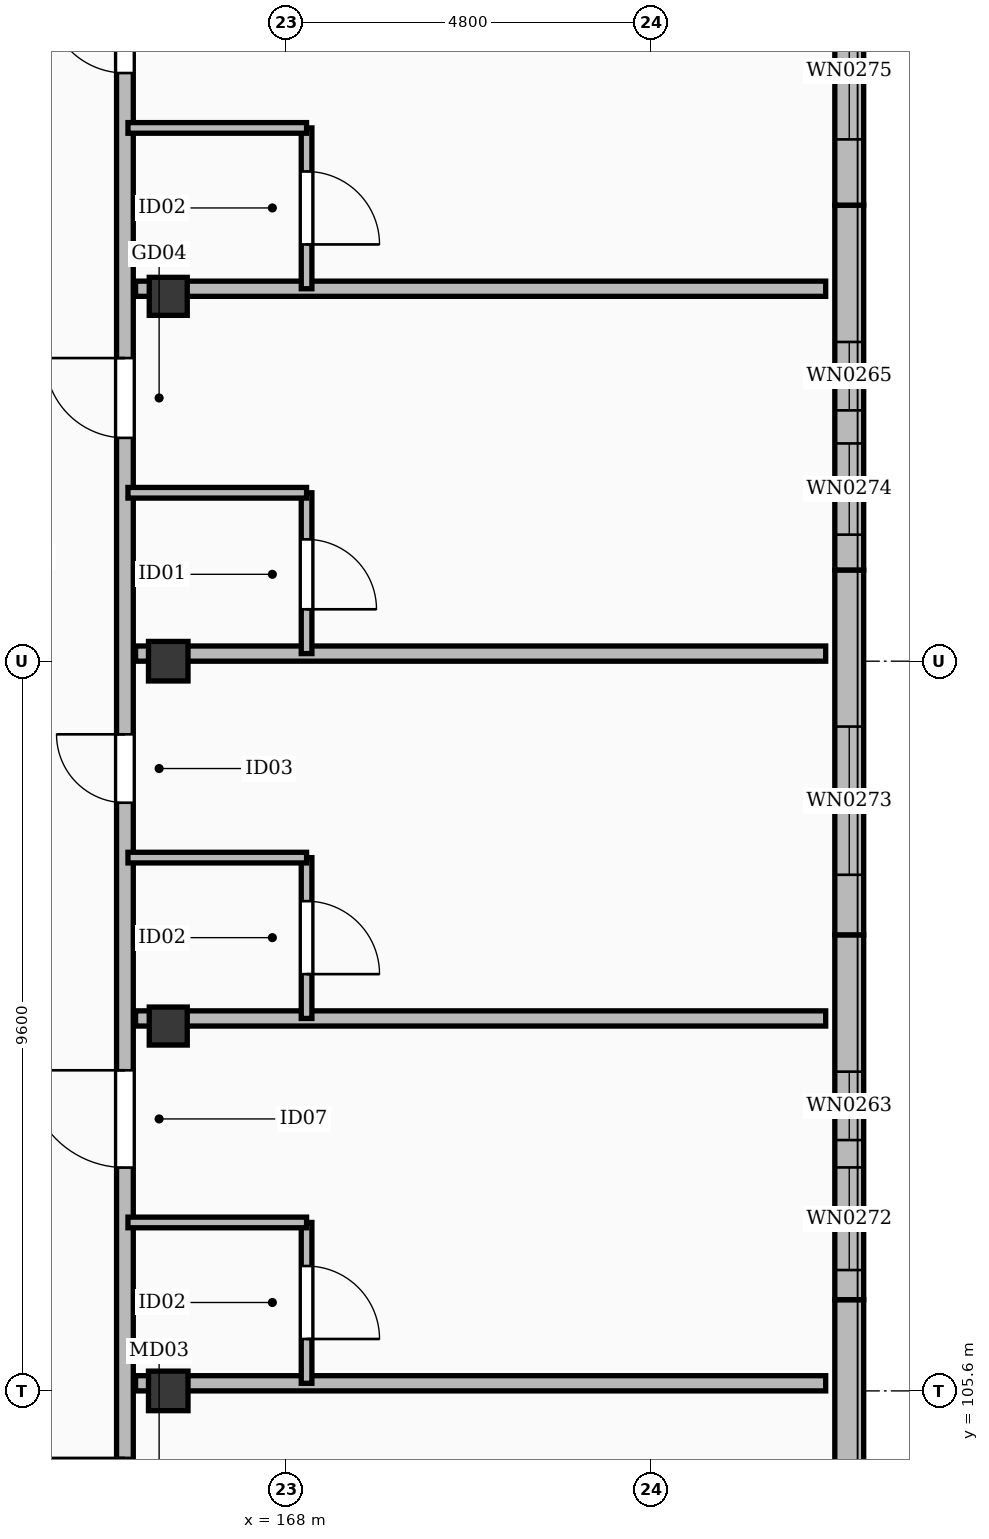
"""IFC4 building model, lengths in metres.
Left out: names, types, materials, properties, quantities, classifications, styles, units other than length and angle.
Written with IfcOpenShell. Run it as: python <this file> out.ifc"""

import sys

from ifc_helpers import new_model, si_unit, direction, frame, frame_2d, origin, origin_2d, place, context, subcontext, project, spatial, rectangle, extrude, element, fill, save


model = new_model("IFC4")
c1 = context("Model", 3, precision=1e-05, world=origin(), true_north=direction((0.0, 1.0)))
c2 = subcontext(c1, "Body", "Model", "MODEL_VIEW")
j1 = project(units=[si_unit("LENGTHUNIT", "METRE"), si_unit("PLANEANGLEUNIT", "RADIAN")], contexts=[c1])
p1 = place(None, origin())
s1 = spatial("IfcSite", under=j1, at=p1, CompositionType="ELEMENT")
p2 = place(p1, origin())
s2 = spatial("IfcBuilding", under=s1, at=p2, CompositionType="ELEMENT")
p3 = place(p2, frame((0.0, 0.0, 50.4)))
s3 = spatial("IfcBuildingStorey", under=s2, at=p3, CompositionType="ELEMENT", Elevation=50.4)
for number, where, z_axis, x_axis in (
    (1, (166.45, 105.6, 0.0), (0.0, 0.0, 1.0), (1.0, 0.0, 0.0)),
    (2, (166.45, 115.2, 0.0), (0.0, 0.0, 1.0), (1.0, 0.0, 0.0)),
):
    element("IfcColumn", number, at=place(p3, frame(where, z_axis=z_axis, x_axis=x_axis)), inside=s3, PredefinedType="COLUMN", context=c2, shape_type="SweptSolid", body=[
        extrude(rectangle(XDim=0.52, YDim=0.52, at=origin_2d()), origin(), (0.0, 0.0, 1.0), 4.2),
    ])
for number, where, z_axis, x_axis in (
    (3, (166.45, 110.4, 0.0), (0.0, 0.0, 1.0), (1.0, 0.0, 0.0)),
    (4, (166.45, 120.0, 0.0), (0.0, 0.0, 1.0), (1.0, 0.0, 0.0)),
):
    element("IfcColumn", number, at=place(p3, frame(where, z_axis=z_axis, x_axis=x_axis)), inside=s3, PredefinedType="COLUMN", context=c2, shape_type="SweptSolid", body=[
        extrude(rectangle(XDim=0.5, YDim=0.5, at=origin_2d()), origin(), (0.0, 0.0, 1.0), 4.2),
    ])
p4 = place(p3, frame((175.41, 106.8, 0.0), z_axis=(0.0, 0.0, 1.0), x_axis=(0.0, -1.0, 0.0)))
e5 = element("IfcWall", 5, at=p4, inside=s3, PredefinedType="SOLIDWALL", context=c2, shape_type="SweptSolid", body=[
    extrude(rectangle(XDim=4.8, YDim=0.38, at=frame_2d((2.4, 0.0))), origin(), (0.0, 0.0, 1.0), 3.96),
])
p5 = place(p4, frame((2.51, 0.0, 0.55)))
e6 = element("IfcOpeningElement", 6, at=p5, cuts=e5, PredefinedType="OPENING", context=c2, shape_type="SweptSolid", body=[
    extrude(rectangle(XDim=1.05, YDim=1.65, at=frame_2d((0.525, 0.825))), frame((0.0, 0.202, 0.0), z_axis=(0.0, -1.0, 0.0), x_axis=(1.0, 0.0, 0.0)), (0.0, 0.0, 1.0), 0.404),
])
p6 = place(p3, frame((175.41, 111.6, 0.0), z_axis=(0.0, 0.0, 1.0), x_axis=(0.0, -1.0, 0.0)))
e7 = element("IfcWall", 7, at=p6, inside=s3, PredefinedType="SOLIDWALL", context=c2, shape_type="SweptSolid", body=[
    extrude(rectangle(XDim=4.8, YDim=0.38, at=frame_2d((2.4, 0.0))), origin(), (0.0, 0.0, 1.0), 3.96),
])
p7 = place(p6, frame((1.8, 0.0, 0.35)))
e8 = element("IfcOpeningElement", 8, at=p7, cuts=e7, PredefinedType="OPENING", context=c2, shape_type="SweptSolid", body=[
    extrude(rectangle(XDim=0.9, YDim=1.68, at=frame_2d((0.45, 0.84))), frame((0.0, 0.202, 0.0), z_axis=(0.0, -1.0, 0.0), x_axis=(1.0, 0.0, 0.0)), (0.0, 0.0, 1.0), 0.404),
])
p8 = place(p6, frame((3.06, 0.0, 0.55)))
e9 = element("IfcOpeningElement", 9, at=p8, cuts=e7, PredefinedType="OPENING", context=c2, shape_type="SweptSolid", body=[
    extrude(rectangle(XDim=1.35, YDim=1.73, at=frame_2d((0.675, 0.865))), frame((0.0, 0.202, 0.0), z_axis=(0.0, -1.0, 0.0), x_axis=(1.0, 0.0, 0.0)), (0.0, 0.0, 1.0), 0.404),
])
p9 = place(p3, frame((175.41, 116.4, 0.0), z_axis=(0.0, 0.0, 1.0), x_axis=(0.0, -1.0, 0.0)))
e10 = element("IfcWall", 10, at=p9, inside=s3, PredefinedType="SOLIDWALL", context=c2, shape_type="SweptSolid", body=[
    extrude(rectangle(XDim=4.8, YDim=0.38, at=frame_2d((2.4, 0.0))), origin(), (0.0, 0.0, 1.0), 3.96),
])
p10 = place(p9, frame((2.06, 0.0, 0.55)))
e11 = element("IfcOpeningElement", 11, at=p10, cuts=e10, PredefinedType="OPENING", context=c2, shape_type="SweptSolid", body=[
    extrude(rectangle(XDim=1.95, YDim=1.77, at=frame_2d((0.975, 0.885))), frame((0.0, 0.202, 0.0), z_axis=(0.0, -1.0, 0.0), x_axis=(1.0, 0.0, 0.0)), (0.0, 0.0, 1.0), 0.404),
])
p11 = place(p3, frame((175.41, 121.2, 0.0), z_axis=(0.0, 0.0, 1.0), x_axis=(0.0, -1.0, 0.0)))
e12 = element("IfcWall", 12, at=p11, inside=s3, PredefinedType="SOLIDWALL", context=c2, shape_type="SweptSolid", body=[
    extrude(rectangle(XDim=4.8, YDim=0.38, at=frame_2d((2.4, 0.0))), origin(), (0.0, 0.0, 1.0), 3.96),
])
p12 = place(p11, frame((1.8, 0.0, 0.35)))
e13 = element("IfcOpeningElement", 13, at=p12, cuts=e12, PredefinedType="OPENING", context=c2, shape_type="SweptSolid", body=[
    extrude(rectangle(XDim=0.9, YDim=1.68, at=frame_2d((0.45, 0.84))), frame((0.0, 0.202, 0.0), z_axis=(0.0, -1.0, 0.0), x_axis=(1.0, 0.0, 0.0)), (0.0, 0.0, 1.0), 0.404),
])
p13 = place(p11, frame((3.135, 0.0, 0.55)))
e14 = element("IfcOpeningElement", 14, at=p13, cuts=e12, PredefinedType="OPENING", context=c2, shape_type="SweptSolid", body=[
    extrude(rectangle(XDim=1.2, YDim=1.72, at=frame_2d((0.6, 0.86))), frame((0.0, 0.202, 0.0), z_axis=(0.0, -1.0, 0.0), x_axis=(1.0, 0.0, 0.0)), (0.0, 0.0, 1.0), 0.404),
])
p14 = place(p3, frame((175.41, 126.0, 0.0), z_axis=(0.0, 0.0, 1.0), x_axis=(0.0, -1.0, 0.0)))
e15 = element("IfcWall", 15, at=p14, inside=s3, PredefinedType="SOLIDWALL", context=c2, shape_type="SweptSolid", body=[
    extrude(rectangle(XDim=4.8, YDim=0.38, at=frame_2d((2.4, 0.0))), origin(), (0.0, 0.0, 1.0), 3.96),
])
p15 = place(p14, frame((2.135, 0.0, 0.55)))
e16 = element("IfcOpeningElement", 16, at=p15, cuts=e15, PredefinedType="OPENING", context=c2, shape_type="SweptSolid", body=[
    extrude(rectangle(XDim=1.8, YDim=1.76, at=frame_2d((0.9, 0.88))), frame((0.0, 0.202, 0.0), z_axis=(0.0, -1.0, 0.0), x_axis=(1.0, 0.0, 0.0)), (0.0, 0.0, 1.0), 0.404),
])
p16 = place(p3, frame((165.88, 73.55, 0.0), z_axis=(0.0, 0.0, 1.0), x_axis=(0.0, 1.0, 0.0)))
e17 = element("IfcWall", 17, at=p16, inside=s3, PredefinedType="PARTITIONING", context=c2, shape_type="SweptSolid", body=[
    extrude(rectangle(XDim=52.1, YDim=0.22, at=frame_2d((26.05, 0.0))), origin(), (0.0, 0.0, 1.0), 3.202),
])
p17 = place(p16, frame((5.9, 0.0, 0.0)))
e18 = element("IfcOpeningElement", 18, at=p17, cuts=e17, PredefinedType="OPENING", context=c2, shape_type="SweptSolid", body=[
    extrude(rectangle(XDim=1.12, YDim=2.15, at=frame_2d((0.56, 1.075))), frame((0.0, 0.122, 0.0), z_axis=(0.0, -1.0, 0.0), x_axis=(1.0, 0.0, 0.0)), (0.0, 0.0, 1.0), 0.244),
])
p18 = place(p16, frame((15.788, 0.0, 0.0)))
e19 = element("IfcOpeningElement", 19, at=p18, cuts=e17, PredefinedType="OPENING", context=c2, shape_type="SweptSolid", body=[
    extrude(rectangle(XDim=1.05, YDim=2.22, at=frame_2d((0.525, 1.11))), frame((0.0, 0.122, 0.0), z_axis=(0.0, -1.0, 0.0), x_axis=(1.0, 0.0, 0.0)), (0.0, 0.0, 1.0), 0.244),
])
p19 = place(p16, frame((20.588, 0.0, 0.0)))
e20 = element("IfcOpeningElement", 20, at=p19, cuts=e17, PredefinedType="OPENING", context=c2, shape_type="SweptSolid", body=[
    extrude(rectangle(XDim=1.02, YDim=2.2, at=frame_2d((0.51, 1.1))), frame((0.0, 0.122, 0.0), z_axis=(0.0, -1.0, 0.0), x_axis=(1.0, 0.0, 0.0)), (0.0, 0.0, 1.0), 0.244),
])
p20 = place(p16, frame((25.388, 0.0, 0.0)))
e21 = element("IfcOpeningElement", 21, at=p20, cuts=e17, PredefinedType="OPENING", context=c2, shape_type="SweptSolid", body=[
    extrude(rectangle(XDim=1.14, YDim=2.26, at=frame_2d((0.57, 1.13))), frame((0.0, 0.122, 0.0), z_axis=(0.0, -1.0, 0.0), x_axis=(1.0, 0.0, 0.0)), (0.0, 0.0, 1.0), 0.244),
])
p21 = place(p16, frame((30.188, 0.0, 0.0)))
e22 = element("IfcOpeningElement", 22, at=p21, cuts=e17, PredefinedType="OPENING", context=c2, shape_type="SweptSolid", body=[
    extrude(rectangle(XDim=0.98, YDim=2.15, at=frame_2d((0.49, 1.075))), frame((0.0, 0.122, 0.0), z_axis=(0.0, -1.0, 0.0), x_axis=(1.0, 0.0, 0.0)), (0.0, 0.0, 1.0), 0.244),
])
p22 = place(p16, frame((34.988, 0.0, 0.0)))
e23 = element("IfcOpeningElement", 23, at=p22, cuts=e17, PredefinedType="OPENING", context=c2, shape_type="SweptSolid", body=[
    extrude(rectangle(XDim=1.28, YDim=2.16, at=frame_2d((0.64, 1.08))), frame((0.0, 0.122, 0.0), z_axis=(0.0, -1.0, 0.0), x_axis=(1.0, 0.0, 0.0)), (0.0, 0.0, 1.0), 0.244),
])
p23 = place(p16, frame((39.788, 0.0, 0.0)))
e24 = element("IfcOpeningElement", 24, at=p23, cuts=e17, PredefinedType="OPENING", context=c2, shape_type="SweptSolid", body=[
    extrude(rectangle(XDim=0.9, YDim=2.08, at=frame_2d((0.45, 1.04))), frame((0.0, 0.122, 0.0), z_axis=(0.0, -1.0, 0.0), x_axis=(1.0, 0.0, 0.0)), (0.0, 0.0, 1.0), 0.244),
])
p24 = place(p16, frame((44.588, 0.0, 0.0)))
e25 = element("IfcOpeningElement", 25, at=p24, cuts=e17, PredefinedType="OPENING", context=c2, shape_type="SweptSolid", body=[
    extrude(rectangle(XDim=1.05, YDim=2.22, at=frame_2d((0.525, 1.11))), frame((0.0, 0.122, 0.0), z_axis=(0.0, -1.0, 0.0), x_axis=(1.0, 0.0, 0.0)), (0.0, 0.0, 1.0), 0.244),
])
p25 = place(p16, frame((49.388, 0.0, 0.0)))
e26 = element("IfcOpeningElement", 26, at=p25, cuts=e17, PredefinedType="OPENING", context=c2, shape_type="SweptSolid", body=[
    extrude(rectangle(XDim=1.02, YDim=2.2, at=frame_2d((0.51, 1.1))), frame((0.0, 0.122, 0.0), z_axis=(0.0, -1.0, 0.0), x_axis=(1.0, 0.0, 0.0)), (0.0, 0.0, 1.0), 0.244),
])
p26 = place(p3, frame((166.02, 105.7, 0.0), z_axis=(0.0, 0.0, 1.0), x_axis=(1.0, 0.0, 0.0)))
e27 = element("IfcWall", 27, at=p26, inside=s3, PredefinedType="PARTITIONING", context=c2, shape_type="SweptSolid", body=[
    extrude(rectangle(XDim=9.08, YDim=0.2, at=frame_2d((4.54, 0.0))), origin(), (0.0, 0.0, 1.0), 3.352),
])
p27 = place(p3, frame((168.27, 105.7, 0.0), z_axis=(0.0, 0.0, 1.0), x_axis=(0.0, 1.0, 0.0)))
e28 = element("IfcWall", 28, at=p27, inside=s3, PredefinedType="PARTITIONING", context=c2, shape_type="SweptSolid", body=[
    extrude(rectangle(XDim=2.116, YDim=0.14, at=frame_2d((1.058, 0.0))), origin(), (0.0, 0.0, 1.0), 3.96),
])
p28 = place(p27, frame((0.583, 0.0, 0.0)))
e29 = element("IfcOpeningElement", 29, at=p28, cuts=e28, PredefinedType="OPENING", context=c2, shape_type="SweptSolid", body=[
    extrude(rectangle(XDim=0.96, YDim=2.12, at=frame_2d((0.48, 1.06))), frame((0.0, 0.082, 0.0), z_axis=(0.0, -1.0, 0.0), x_axis=(1.0, 0.0, 0.0)), (0.0, 0.0, 1.0), 0.164),
])
p29 = place(p3, frame((165.92, 107.816, 0.0), z_axis=(0.0, 0.0, 1.0), x_axis=(1.0, 0.0, 0.0)))
e30 = element("IfcWall", 30, at=p29, inside=s3, PredefinedType="PARTITIONING", context=c2, shape_type="SweptSolid", body=[
    extrude(rectangle(XDim=2.35, YDim=0.14, at=frame_2d((1.175, 0.0))), origin(), (0.0, 0.0, 1.0), 3.352),
])
p30 = place(p3, frame((166.02, 110.5, 0.0), z_axis=(0.0, 0.0, 1.0), x_axis=(1.0, 0.0, 0.0)))
e31 = element("IfcWall", 31, at=p30, inside=s3, PredefinedType="PARTITIONING", context=c2, shape_type="SweptSolid", body=[
    extrude(rectangle(XDim=9.08, YDim=0.2, at=frame_2d((4.54, 0.0))), origin(), (0.0, 0.0, 1.0), 3.352),
])
p31 = place(p3, frame((168.27, 110.5, 0.0), z_axis=(0.0, 0.0, 1.0), x_axis=(0.0, 1.0, 0.0)))
e32 = element("IfcWall", 32, at=p31, inside=s3, PredefinedType="PARTITIONING", context=c2, shape_type="SweptSolid", body=[
    extrude(rectangle(XDim=2.116, YDim=0.14, at=frame_2d((1.058, 0.0))), origin(), (0.0, 0.0, 1.0), 3.96),
])
p32 = place(p31, frame((0.583, 0.0, 0.0)))
e33 = element("IfcOpeningElement", 33, at=p32, cuts=e32, PredefinedType="OPENING", context=c2, shape_type="SweptSolid", body=[
    extrude(rectangle(XDim=0.96, YDim=2.12, at=frame_2d((0.48, 1.06))), frame((0.0, 0.082, 0.0), z_axis=(0.0, -1.0, 0.0), x_axis=(1.0, 0.0, 0.0)), (0.0, 0.0, 1.0), 0.164),
])
p33 = place(p3, frame((165.92, 112.616, 0.0), z_axis=(0.0, 0.0, 1.0), x_axis=(1.0, 0.0, 0.0)))
e34 = element("IfcWall", 34, at=p33, inside=s3, PredefinedType="PARTITIONING", context=c2, shape_type="SweptSolid", body=[
    extrude(rectangle(XDim=2.35, YDim=0.14, at=frame_2d((1.175, 0.0))), origin(), (0.0, 0.0, 1.0), 3.352),
])
p34 = place(p3, frame((166.02, 115.3, 0.0), z_axis=(0.0, 0.0, 1.0), x_axis=(1.0, 0.0, 0.0)))
e35 = element("IfcWall", 35, at=p34, inside=s3, PredefinedType="PARTITIONING", context=c2, shape_type="SweptSolid", body=[
    extrude(rectangle(XDim=9.08, YDim=0.2, at=frame_2d((4.54, 0.0))), origin(), (0.0, 0.0, 1.0), 3.352),
])
p35 = place(p3, frame((168.27, 115.3, 0.0), z_axis=(0.0, 0.0, 1.0), x_axis=(0.0, 1.0, 0.0)))
e36 = element("IfcWall", 36, at=p35, inside=s3, PredefinedType="PARTITIONING", context=c2, shape_type="SweptSolid", body=[
    extrude(rectangle(XDim=2.116, YDim=0.14, at=frame_2d((1.058, 0.0))), origin(), (0.0, 0.0, 1.0), 3.96),
])
p36 = place(p35, frame((0.583, 0.0, 0.0)))
e37 = element("IfcOpeningElement", 37, at=p36, cuts=e36, PredefinedType="OPENING", context=c2, shape_type="SweptSolid", body=[
    extrude(rectangle(XDim=0.92, YDim=2.1, at=frame_2d((0.46, 1.05))), frame((0.0, 0.082, 0.0), z_axis=(0.0, -1.0, 0.0), x_axis=(1.0, 0.0, 0.0)), (0.0, 0.0, 1.0), 0.164),
])
p37 = place(p3, frame((165.92, 117.416, 0.0), z_axis=(0.0, 0.0, 1.0), x_axis=(1.0, 0.0, 0.0)))
e38 = element("IfcWall", 38, at=p37, inside=s3, PredefinedType="PARTITIONING", context=c2, shape_type="SweptSolid", body=[
    extrude(rectangle(XDim=2.35, YDim=0.14, at=frame_2d((1.175, 0.0))), origin(), (0.0, 0.0, 1.0), 3.352),
])
p38 = place(p3, frame((166.02, 120.1, 0.0), z_axis=(0.0, 0.0, 1.0), x_axis=(1.0, 0.0, 0.0)))
e39 = element("IfcWall", 39, at=p38, inside=s3, PredefinedType="PARTITIONING", context=c2, shape_type="SweptSolid", body=[
    extrude(rectangle(XDim=9.08, YDim=0.2, at=frame_2d((4.54, 0.0))), origin(), (0.0, 0.0, 1.0), 3.352),
])
p39 = place(p3, frame((168.27, 120.1, 0.0), z_axis=(0.0, 0.0, 1.0), x_axis=(0.0, 1.0, 0.0)))
e40 = element("IfcWall", 40, at=p39, inside=s3, PredefinedType="PARTITIONING", context=c2, shape_type="SweptSolid", body=[
    extrude(rectangle(XDim=2.116, YDim=0.14, at=frame_2d((1.058, 0.0))), origin(), (0.0, 0.0, 1.0), 3.96),
])
p40 = place(p39, frame((0.583, 0.0, 0.0)))
e41 = element("IfcOpeningElement", 41, at=p40, cuts=e40, PredefinedType="OPENING", context=c2, shape_type="SweptSolid", body=[
    extrude(rectangle(XDim=0.96, YDim=2.12, at=frame_2d((0.48, 1.06))), frame((0.0, 0.082, 0.0), z_axis=(0.0, -1.0, 0.0), x_axis=(1.0, 0.0, 0.0)), (0.0, 0.0, 1.0), 0.164),
])
p41 = place(p3, frame((165.92, 122.216, 0.0), z_axis=(0.0, 0.0, 1.0), x_axis=(1.0, 0.0, 0.0)))
e42 = element("IfcWall", 42, at=p41, inside=s3, PredefinedType="PARTITIONING", context=c2, shape_type="SweptSolid", body=[
    extrude(rectangle(XDim=2.35, YDim=0.14, at=frame_2d((1.175, 0.0))), origin(), (0.0, 0.0, 1.0), 3.352),
])
p42 = place(p7, origin())
e43 = element("IfcWindow", 43, at=p42, inside=s3, PartitioningType="SINGLE_PANEL", PredefinedType="WINDOW", context=c2, shape_type="SweptSolid", body=[
    extrude(rectangle(XDim=0.9, YDim=1.68, at=frame_2d((0.45, 0.84))), frame((0.0, 0.03, 0.0), z_axis=(0.0, -1.0, 0.0), x_axis=(1.0, 0.0, 0.0)), (0.0, 0.0, 1.0), 0.06),
])
fill(e8, e43)
p43 = place(p12, origin())
e44 = element("IfcWindow", 44, at=p43, inside=s3, PartitioningType="SINGLE_PANEL", PredefinedType="WINDOW", context=c2, shape_type="SweptSolid", body=[
    extrude(rectangle(XDim=0.9, YDim=1.68, at=frame_2d((0.45, 0.84))), frame((0.0, 0.03, 0.0), z_axis=(0.0, -1.0, 0.0), x_axis=(1.0, 0.0, 0.0)), (0.0, 0.0, 1.0), 0.06),
])
fill(e13, e44)
p44 = place(p8, origin())
e45 = element("IfcWindow", 45, at=p44, inside=s3, PartitioningType="SINGLE_PANEL", PredefinedType="WINDOW", context=c2, shape_type="SweptSolid", body=[
    extrude(rectangle(XDim=1.35, YDim=1.73, at=frame_2d((0.675, 0.865))), frame((0.0, 0.03, 0.0), z_axis=(0.0, -1.0, 0.0), x_axis=(1.0, 0.0, 0.0)), (0.0, 0.0, 1.0), 0.06),
])
fill(e9, e45)
p45 = place(p10, origin())
e46 = element("IfcWindow", 46, at=p45, inside=s3, PartitioningType="SINGLE_PANEL", PredefinedType="WINDOW", context=c2, shape_type="SweptSolid", body=[
    extrude(rectangle(XDim=1.95, YDim=1.77, at=frame_2d((0.975, 0.885))), frame((0.0, 0.03, 0.0), z_axis=(0.0, -1.0, 0.0), x_axis=(1.0, 0.0, 0.0)), (0.0, 0.0, 1.0), 0.06),
])
fill(e11, e46)
p46 = place(p13, origin())
e47 = element("IfcWindow", 47, at=p46, inside=s3, PartitioningType="SINGLE_PANEL", PredefinedType="WINDOW", context=c2, shape_type="SweptSolid", body=[
    extrude(rectangle(XDim=1.2, YDim=1.72, at=frame_2d((0.6, 0.86))), frame((0.0, 0.03, 0.0), z_axis=(0.0, -1.0, 0.0), x_axis=(1.0, 0.0, 0.0)), (0.0, 0.0, 1.0), 0.06),
])
fill(e14, e47)
p47 = place(p15, origin())
e48 = element("IfcWindow", 48, at=p47, inside=s3, PartitioningType="SINGLE_PANEL", PredefinedType="WINDOW", context=c2, shape_type="SweptSolid", body=[
    extrude(rectangle(XDim=1.8, YDim=1.76, at=frame_2d((0.9, 0.88))), frame((0.0, 0.03, 0.0), z_axis=(0.0, -1.0, 0.0), x_axis=(1.0, 0.0, 0.0)), (0.0, 0.0, 1.0), 0.06),
])
fill(e16, e48)
p48 = place(p21, origin())
e49 = element("IfcDoor", 49, at=p48, inside=s3, OperationType="SINGLE_SWING_RIGHT", PredefinedType="DOOR", context=c2, shape_type="SweptSolid", body=[
    extrude(rectangle(XDim=0.98, YDim=2.15, at=frame_2d((0.49, 1.075))), frame((0.0, 0.025, 0.0), z_axis=(0.0, -1.0, 0.0), x_axis=(1.0, 0.0, 0.0)), (0.0, 0.0, 1.0), 0.05),
])
fill(e22, e49)
p49 = place(p22, origin())
e50 = element("IfcDoor", 50, at=p49, inside=s3, OperationType="SINGLE_SWING_RIGHT", PredefinedType="DOOR", context=c2, shape_type="SweptSolid", body=[
    extrude(rectangle(XDim=1.28, YDim=2.16, at=frame_2d((0.64, 1.08))), frame((0.0, 0.025, 0.0), z_axis=(0.0, -1.0, 0.0), x_axis=(1.0, 0.0, 0.0)), (0.0, 0.0, 1.0), 0.05),
])
fill(e23, e50)
p50 = place(p28, frame((0.96, 0.0, 0.0), z_axis=(0.0, 0.0, 1.0), x_axis=(-1.0, 0.0, 0.0)))
e51 = element("IfcDoor", 51, at=p50, inside=s3, OperationType="SINGLE_SWING_LEFT", PredefinedType="DOOR", context=c2, shape_type="SweptSolid", body=[
    extrude(rectangle(XDim=0.96, YDim=2.12, at=frame_2d((0.48, 1.06))), frame((0.0, 0.025, 0.0), z_axis=(0.0, -1.0, 0.0), x_axis=(1.0, 0.0, 0.0)), (0.0, 0.0, 1.0), 0.05),
])
fill(e29, e51)
p51 = place(p23, origin())
e52 = element("IfcDoor", 52, at=p51, inside=s3, OperationType="SINGLE_SWING_RIGHT", PredefinedType="DOOR", context=c2, shape_type="SweptSolid", body=[
    extrude(rectangle(XDim=0.9, YDim=2.08, at=frame_2d((0.45, 1.04))), frame((0.0, 0.025, 0.0), z_axis=(0.0, -1.0, 0.0), x_axis=(1.0, 0.0, 0.0)), (0.0, 0.0, 1.0), 0.05),
])
fill(e24, e52)
p52 = place(p32, frame((0.96, 0.0, 0.0), z_axis=(0.0, 0.0, 1.0), x_axis=(-1.0, 0.0, 0.0)))
e53 = element("IfcDoor", 53, at=p52, inside=s3, OperationType="SINGLE_SWING_LEFT", PredefinedType="DOOR", context=c2, shape_type="SweptSolid", body=[
    extrude(rectangle(XDim=0.96, YDim=2.12, at=frame_2d((0.48, 1.06))), frame((0.0, 0.025, 0.0), z_axis=(0.0, -1.0, 0.0), x_axis=(1.0, 0.0, 0.0)), (0.0, 0.0, 1.0), 0.05),
])
fill(e33, e53)
p53 = place(p24, origin())
e54 = element("IfcDoor", 54, at=p53, inside=s3, OperationType="SINGLE_SWING_RIGHT", PredefinedType="DOOR", context=c2, shape_type="SweptSolid", body=[
    extrude(rectangle(XDim=1.05, YDim=2.22, at=frame_2d((0.525, 1.11))), frame((0.0, 0.025, 0.0), z_axis=(0.0, -1.0, 0.0), x_axis=(1.0, 0.0, 0.0)), (0.0, 0.0, 1.0), 0.05),
])
fill(e25, e54)
p54 = place(p36, frame((0.92, 0.0, 0.0), z_axis=(0.0, 0.0, 1.0), x_axis=(-1.0, 0.0, 0.0)))
e55 = element("IfcDoor", 55, at=p54, inside=s3, OperationType="SINGLE_SWING_LEFT", PredefinedType="DOOR", context=c2, shape_type="SweptSolid", body=[
    extrude(rectangle(XDim=0.92, YDim=2.1, at=frame_2d((0.46, 1.05))), frame((0.0, 0.025, 0.0), z_axis=(0.0, -1.0, 0.0), x_axis=(1.0, 0.0, 0.0)), (0.0, 0.0, 1.0), 0.05),
])
fill(e37, e55)
p55 = place(p25, origin())
e56 = element("IfcDoor", 56, at=p55, inside=s3, OperationType="SINGLE_SWING_RIGHT", PredefinedType="DOOR", context=c2, shape_type="SweptSolid", body=[
    extrude(rectangle(XDim=1.02, YDim=2.2, at=frame_2d((0.51, 1.1))), frame((0.0, 0.025, 0.0), z_axis=(0.0, -1.0, 0.0), x_axis=(1.0, 0.0, 0.0)), (0.0, 0.0, 1.0), 0.05),
])
fill(e26, e56)
p56 = place(p40, frame((0.96, 0.0, 0.0), z_axis=(0.0, 0.0, 1.0), x_axis=(-1.0, 0.0, 0.0)))
e57 = element("IfcDoor", 57, at=p56, inside=s3, OperationType="SINGLE_SWING_LEFT", PredefinedType="DOOR", context=c2, shape_type="SweptSolid", body=[
    extrude(rectangle(XDim=0.96, YDim=2.12, at=frame_2d((0.48, 1.06))), frame((0.0, 0.025, 0.0), z_axis=(0.0, -1.0, 0.0), x_axis=(1.0, 0.0, 0.0)), (0.0, 0.0, 1.0), 0.05),
])
fill(e41, e57)
save(model, sys.argv[1])
